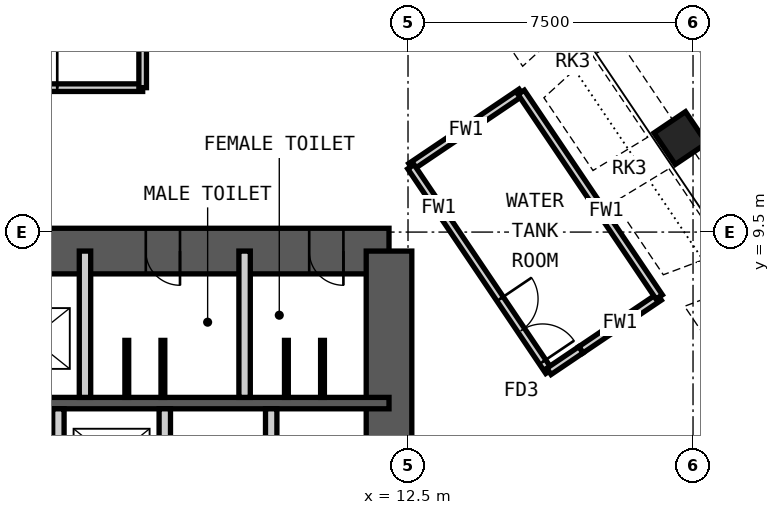
"""IFC4 building model, lengths in metres.
Left out: names, types, materials, properties, quantities, classifications, styles, units other than length and angle.
Written with IfcOpenShell. Run it as: python <this file> out.ifc"""

import sys

from ifc_helpers import new_model, si_unit, direction, frame, frame_2d, origin, origin_2d, place, context, subcontext, project, spatial, rectangle, hollow_rectangle, extrude, clip, halfspace, element, fill, save


model = new_model("IFC4")
c1 = context("Model", 3, precision=1e-05, world=origin(), true_north=direction((0.0, 1.0)))
c2 = subcontext(c1, "Body", "Model", "MODEL_VIEW")
j1 = project(units=[si_unit("LENGTHUNIT", "METRE"), si_unit("PLANEANGLEUNIT", "RADIAN")], contexts=[c1])
p1 = place(None, origin())
s1 = spatial("IfcSite", under=j1, at=p1, CompositionType="ELEMENT")
p2 = place(p1, origin())
s2 = spatial("IfcBuilding", under=s1, at=p2, CompositionType="ELEMENT")
p3 = place(p2, frame((0.0, 0.0, 256.0)))
s3 = spatial("IfcBuildingStorey", under=s2, at=p3, CompositionType="ELEMENT", Elevation=256.0)
p4 = place(p3, frame((17.635, 14.986, 0.0), z_axis=(-0.236032117979, -0.214939229801, 0.947676087477), x_axis=(0.204390465263, 0.942433783301, 0.264656573323)))
e1 = element("IfcColumn", 1, at=p4, inside=s3, PredefinedType="COLUMN", context=c2, shape_type="Clipping", body=[
    clip(clip(extrude(hollow_rectangle(XDim=1.0, YDim=1.0, WallThickness=0.08, at=origin_2d()), origin(), (0.0, 0.0, 1.0), 6.331), halfspace(frame((0.0, 0.0, 0.168), z_axis=(0.0, 0.0, -1.0), x_axis=(0.0, -1.0, 0.0)), False)), halfspace(frame((0.0, 0.0, 6.163), z_axis=(0.0, 0.0, 1.0), x_axis=(0.0, 1.0, 0.0)), False)),
])
p5 = place(p3, frame((19.667, 11.973, 0.0), z_axis=(-0.270378388975, -0.164581506151, 0.948582339393), x_axis=(0.38099195494, 0.88655690783, 0.262415661594)))
e2 = element("IfcColumn", 2, at=p5, inside=s3, PredefinedType="COLUMN", context=c2, shape_type="Clipping", body=[
    clip(clip(extrude(hollow_rectangle(XDim=1.0, YDim=1.0, WallThickness=0.08, at=origin_2d()), origin(), (0.0, 0.0, 1.0), 6.325), halfspace(frame((0.0, 0.0, 0.162), z_axis=(0.0, 0.0, -1.0), x_axis=(0.0, -1.0, 0.0)), False)), halfspace(frame((0.0, 0.0, 6.163), z_axis=(0.0, 0.0, 1.0), x_axis=(0.0, 1.0, 0.0)), False)),
])
p6 = place(p3, frame((21.699, 8.961, 0.0), z_axis=(-0.303623148474, -0.113781697121, 0.945973947374), x_axis=(0.53814609826, 0.798836854124, 0.268809332839)))
e3 = element("IfcColumn", 3, at=p6, inside=s3, PredefinedType="COLUMN", context=c2, shape_type="Clipping", body=[
    clip(clip(extrude(hollow_rectangle(XDim=1.0, YDim=1.0, WallThickness=0.08, at=origin_2d()), origin(), (0.0, 0.0, 1.0), 6.343), halfspace(frame((0.0, 0.0, 0.185), z_axis=(0.0, 0.0, -1.0), x_axis=(0.0, -1.0, 0.0)), False)), halfspace(frame((0.0, 0.0, 6.158), z_axis=(0.0, 0.0, 1.0), x_axis=(0.0, 1.0, 0.0)), False)),
])
p7 = place(p3, frame((-12.0, 9.0, 0.0), z_axis=(0.0, 0.0, 1.0), x_axis=(1.0, 0.0, 0.0)))
e4 = element("IfcWall", 4, at=p7, inside=s3, PredefinedType="SHEAR", context=c2, shape_type="SweptSolid", body=[
    extrude(rectangle(XDim=24.0, YDim=1.2, at=frame_2d((12.0, 0.0))), origin(), (0.0, 0.0, 1.0), 6.0),
])
p8 = place(p7, frame((10.4, 0.0, 0.0)))
e5 = element("IfcOpeningElement", 5, at=p8, cuts=e4, PredefinedType="OPENING", context=c2, shape_type="SweptSolid", body=[
    extrude(rectangle(XDim=1.0, YDim=2.1, at=frame_2d((0.5, 1.05))), frame((0.0, 0.61, 0.0), z_axis=(0.0, -1.0, 0.0), x_axis=(1.0, 0.0, 0.0)), (0.0, 0.0, 1.0), 1.22),
])
p9 = place(p7, frame((17.6, 0.0, 0.0)))
e6 = element("IfcOpeningElement", 6, at=p9, cuts=e4, PredefinedType="OPENING", context=c2, shape_type="SweptSolid", body=[
    extrude(rectangle(XDim=0.9, YDim=2.1, at=frame_2d((0.45, 1.05))), frame((0.0, 0.61, 0.0), z_axis=(0.0, -1.0, 0.0), x_axis=(1.0, 0.0, 0.0)), (0.0, 0.0, 1.0), 1.22),
])
p10 = place(p7, frame((21.9, 0.0, 0.0)))
e7 = element("IfcOpeningElement", 7, at=p10, cuts=e4, PredefinedType="OPENING", context=c2, shape_type="SweptSolid", body=[
    extrude(rectangle(XDim=0.9, YDim=2.1, at=frame_2d((0.45, 1.05))), frame((0.0, 0.61, 0.0), z_axis=(0.0, -1.0, 0.0), x_axis=(1.0, 0.0, 0.0)), (0.0, 0.0, 1.0), 1.22),
])
p11 = place(p3, frame((12.0, -9.0, 0.0), z_axis=(0.0, 0.0, 1.0), x_axis=(0.0, 1.0, 0.0)))
e8 = element("IfcWall", 8, at=p11, inside=s3, PredefinedType="SHEAR", context=c2, shape_type="SweptSolid", body=[
    extrude(rectangle(XDim=18.0, YDim=1.2, at=frame_2d((9.0, 0.0))), origin(), (0.0, 0.0, 1.0), 6.0),
])
p12 = place(p11, frame((8.1, 0.0, 0.0)))
e9 = element("IfcOpeningElement", 9, at=p12, cuts=e8, PredefinedType="OPENING", context=c2, shape_type="SweptSolid", body=[
    extrude(rectangle(XDim=1.8, YDim=2.1, at=frame_2d((0.9, 1.05))), frame((0.0, 0.61, 0.0), z_axis=(0.0, -1.0, 0.0), x_axis=(1.0, 0.0, 0.0)), (0.0, 0.0, 1.0), 1.22),
])
p13 = place(p3, frame((-12.0, 5.0, 0.0), z_axis=(0.0, 0.0, 1.0), x_axis=(1.0, 0.0, 0.0)))
e10 = element("IfcWall", 10, at=p13, inside=s3, PredefinedType="SHEAR", context=c2, shape_type="SweptSolid", body=[
    extrude(rectangle(XDim=24.0, YDim=0.3, at=frame_2d((12.0, 0.0))), origin(), (0.0, 0.0, 1.0), 6.0),
])
for number, where, z_axis, x_axis in (
    (11, (4.0, 5.15, 0.0), (0.0, 0.0, 1.0), (0.0, 1.0, 0.0)),
    (12, (8.2, 5.15, 0.0), (0.0, 0.0, 1.0), (0.0, 1.0, 0.0)),
):
    element("IfcWall", number, at=place(p3, frame(where, z_axis=z_axis, x_axis=x_axis)), inside=s3, PredefinedType="PARTITIONING", context=c2, shape_type="SweptSolid", body=[
        extrude(rectangle(XDim=3.85, YDim=0.3, at=frame_2d((1.925, 0.0))), origin(), (0.0, 0.0, 1.0), 5.78),
    ])
for number, where, z_axis, x_axis in (
    (13, (3.3, 2.2, 0.0), (0.0, 0.0, 1.0), (0.0, 1.0, 0.0)),
    (14, (6.1, 2.2, 0.0), (0.0, 0.0, 1.0), (0.0, 1.0, 0.0)),
    (15, (8.9, 2.2, 0.0), (0.0, 0.0, 1.0), (0.0, 1.0, 0.0)),
):
    element("IfcWall", number, at=place(p3, frame(where, z_axis=z_axis, x_axis=x_axis)), inside=s3, PredefinedType="PARTITIONING", context=c2, shape_type="SweptSolid", body=[
        extrude(rectangle(XDim=2.65, YDim=0.3, at=frame_2d((1.325, 0.0))), origin(), (0.0, 0.0, 1.0), 5.78),
    ])
for number, where, z_axis, x_axis in (
    (16, (5.1, 5.15, 0.0), (0.0, 0.0, 1.0), (0.0, 1.0, 0.0)),
    (17, (6.05, 5.15, 0.0), (0.0, 0.0, 1.0), (0.0, 1.0, 0.0)),
    (18, (9.3, 5.15, 0.0), (0.0, 0.0, 1.0), (0.0, 1.0, 0.0)),
    (19, (10.25, 5.15, 0.0), (0.0, 0.0, 1.0), (0.0, 1.0, 0.0)),
):
    element("IfcWall", number, at=place(p3, frame(where, z_axis=z_axis, x_axis=x_axis)), inside=s3, PredefinedType="PARTITIONING", context=c2, shape_type="SweptSolid", body=[
        extrude(rectangle(XDim=1.5, YDim=0.1, at=frame_2d((0.75, 0.0))), origin(), (0.0, 0.0, 1.0), 2.1),
    ])
p14 = place(p3, frame((-0.978, 13.3, 0.0), z_axis=(0.0, 0.0, 1.0), x_axis=(1.0, 0.0, 0.0)))
e20 = element("IfcWall", 20, at=p14, inside=s3, PredefinedType="PARTITIONING", context=c2, shape_type="SweptSolid", body=[
    extrude(rectangle(XDim=6.496, YDim=0.2, at=frame_2d((3.248, 0.0))), origin(), (0.0, 0.0, 1.0), 5.83),
])
p15 = place(p14, frame((2.248, 0.0, 0.0)))
e21 = element("IfcOpeningElement", 21, at=p15, cuts=e20, PredefinedType="OPENING", context=c2, shape_type="SweptSolid", body=[
    extrude(rectangle(XDim=2.0, YDim=2.4, at=frame_2d((1.0, 1.2))), frame((0.0, 0.11, 0.0), z_axis=(0.0, -1.0, 0.0), x_axis=(1.0, 0.0, 0.0)), (0.0, 0.0, 1.0), 0.22),
])
p16 = place(p3, frame((15.477, 13.177, 0.0), z_axis=(0.0, 0.0, 1.0), x_axis=(-0.82902249413, -0.559215257505, 0.0)))
e22 = element("IfcWall", 22, at=p16, inside=s3, PredefinedType="PARTITIONING", context=c2, shape_type="SweptSolid", body=[
    extrude(rectangle(XDim=3.5, YDim=0.2, at=frame_2d((1.75, 0.0))), origin(), (0.0, 0.0, 1.0), 4.73),
])
p17 = place(p3, frame((19.11, 7.792, 0.0), z_axis=(0.0, 0.0, 1.0), x_axis=(-0.829029753585, -0.559204495396, 0.0)))
e23 = element("IfcWall", 23, at=p17, inside=s3, PredefinedType="PARTITIONING", context=c2, shape_type="SweptSolid", body=[
    extrude(rectangle(XDim=2.485, YDim=0.2, at=frame_2d((1.242, 0.0))), origin(), (0.0, 0.0, 1.0), 4.73),
])
p18 = place(p3, frame((12.576, 11.22, 0.0), z_axis=(0.0, 0.0, 1.0), x_axis=(0.559193332958, -0.829037282862, 0.0)))
e24 = element("IfcWall", 24, at=p18, inside=s3, PredefinedType="PARTITIONING", context=c2, shape_type="SweptSolid", body=[
    extrude(rectangle(XDim=6.496, YDim=0.2, at=frame_2d((3.248, 0.0))), origin(), (0.0, 0.0, 1.0), 5.83),
])
p19 = place(p18, frame((4.197, 0.0, 0.0)))
e25 = element("IfcOpeningElement", 25, at=p19, cuts=e24, PredefinedType="OPENING", context=c2, shape_type="SweptSolid", body=[
    extrude(rectangle(XDim=2.0, YDim=2.4, at=frame_2d((1.0, 1.2))), frame((0.0, 0.11, 0.0), z_axis=(0.0, -1.0, 0.0), x_axis=(1.0, 0.0, 0.0)), (0.0, 0.0, 1.0), 0.22),
])
p20 = place(p3, frame((15.477, 13.177, 0.0), z_axis=(0.0, 0.0, 1.0), x_axis=(0.559193332958, -0.829037282862, 0.0)))
e26 = element("IfcWall", 26, at=p20, inside=s3, PredefinedType="PARTITIONING", context=c2, shape_type="SweptSolid", body=[
    extrude(rectangle(XDim=6.496, YDim=0.2, at=frame_2d((3.248, 0.0))), origin(), (0.0, 0.0, 1.0), 5.83),
])
p21 = place(p3, frame((5.518, 18.455, 0.0), z_axis=(0.0, 0.0, 1.0), x_axis=(0.0, -1.0, 0.0)))
e27 = element("IfcWall", 27, at=p21, inside=s3, PredefinedType="PARTITIONING", context=c2, shape_type="SweptSolid", body=[
    extrude(rectangle(XDim=5.155, YDim=0.2, at=frame_2d((2.578, 0.0))), origin(), (0.0, 0.0, 1.0), 5.83),
])
p22 = place(p3, frame((17.05, 6.403, 0.0), z_axis=(0.0, 0.0, 1.0), x_axis=(-0.82900473073, -0.559241590394, 0.0)))
e28 = element("IfcWall", 28, at=p22, inside=s3, PredefinedType="PARTITIONING", context=c2, shape_type="SweptSolid", body=[
    extrude(rectangle(XDim=1.015, YDim=0.2, at=frame_2d((0.508, 0.0))), origin(), (0.0, 0.0, 1.0), 5.83),
])
p23 = place(p9, origin())
e29 = element("IfcDoor", 29, at=p23, inside=s3, OperationType="SINGLE_SWING_RIGHT", PredefinedType="DOOR", context=c2, shape_type="SweptSolid", body=[
    extrude(rectangle(XDim=0.9, YDim=2.1, at=frame_2d((0.45, 1.05))), frame((0.0, 0.025, 0.0), z_axis=(0.0, -1.0, 0.0), x_axis=(1.0, 0.0, 0.0)), (0.0, 0.0, 1.0), 0.05),
])
fill(e6, e29)
p24 = place(p10, origin())
e30 = element("IfcDoor", 30, at=p24, inside=s3, OperationType="SINGLE_SWING_RIGHT", PredefinedType="DOOR", context=c2, shape_type="SweptSolid", body=[
    extrude(rectangle(XDim=0.9, YDim=2.1, at=frame_2d((0.45, 1.05))), frame((0.0, 0.025, 0.0), z_axis=(0.0, -1.0, 0.0), x_axis=(1.0, 0.0, 0.0)), (0.0, 0.0, 1.0), 0.05),
])
fill(e7, e30)
p25 = place(p15, origin())
e31 = element("IfcDoor", 31, at=p25, inside=s3, OperationType="DOUBLE_DOOR_DOUBLE_SWING", PredefinedType="DOOR", context=c2, shape_type="SweptSolid", body=[
    extrude(rectangle(XDim=2.0, YDim=2.4, at=frame_2d((1.0, 1.2))), frame((0.0, 0.025, 0.0), z_axis=(0.0, -1.0, 0.0), x_axis=(1.0, 0.0, 0.0)), (0.0, 0.0, 1.0), 0.05),
])
fill(e21, e31)
p26 = place(p19, origin())
e32 = element("IfcDoor", 32, at=p26, inside=s3, OperationType="DOUBLE_DOOR_DOUBLE_SWING", PredefinedType="DOOR", context=c2, shape_type="SweptSolid", body=[
    extrude(rectangle(XDim=2.0, YDim=2.4, at=frame_2d((1.0, 1.2))), frame((0.0, 0.025, 0.0), z_axis=(0.0, -1.0, 0.0), x_axis=(1.0, 0.0, 0.0)), (0.0, 0.0, 1.0), 0.05),
])
fill(e25, e32)
save(model, sys.argv[1])
